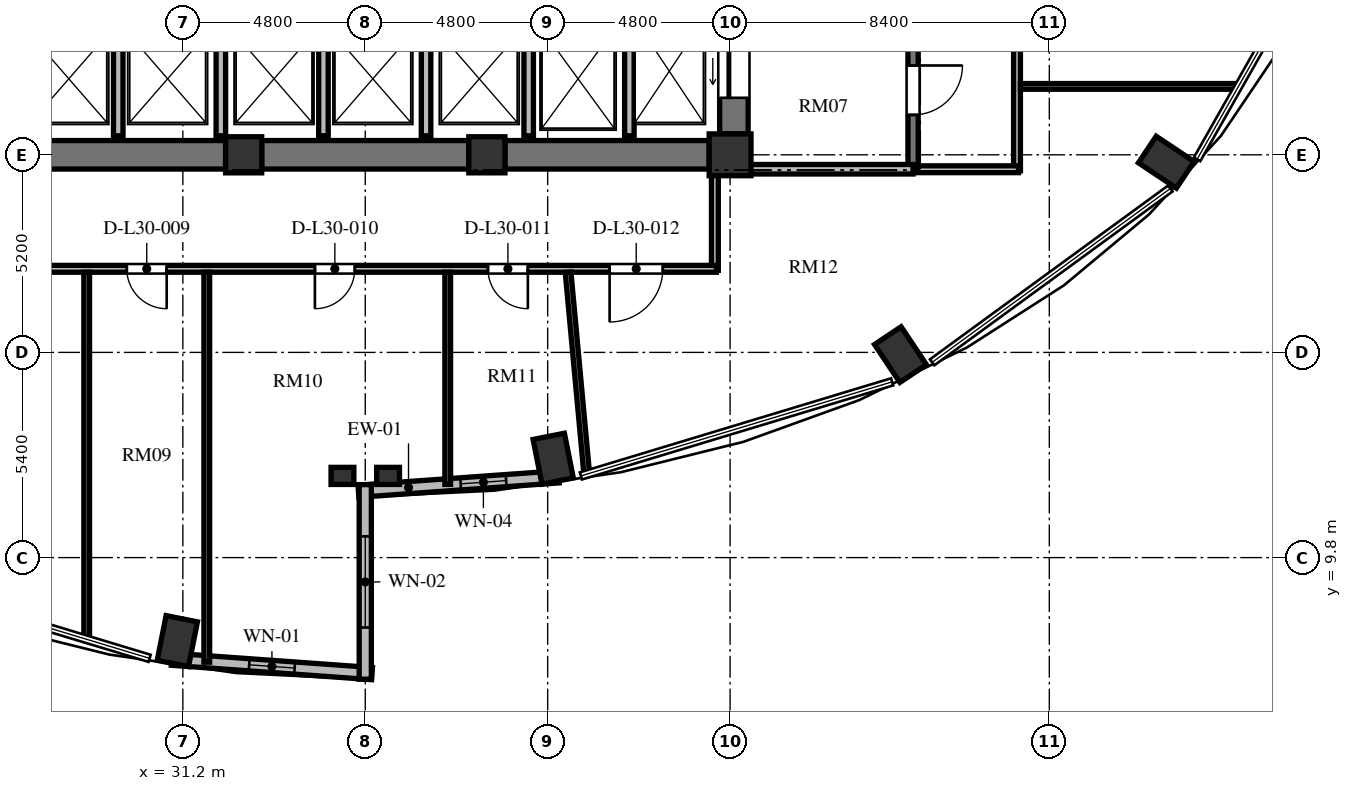
"""IFC4 building model, lengths in metres.
Left out: names, types, materials, properties, quantities, classifications, styles, units other than length and angle.
Written with IfcOpenShell. Run it as: python <this file> out.ifc"""

import sys

from ifc_helpers import new_model, si_unit, direction, frame, frame_2d, origin, origin_2d, place, context, subcontext, project, spatial, rectangle, extrude, element, fill, save


model = new_model("IFC4")
c1 = context("Model", 3, precision=1e-05, world=origin(), true_north=direction((0.0, 1.0)))
c2 = subcontext(c1, "Body", "Model", "MODEL_VIEW")
j1 = project(units=[si_unit("LENGTHUNIT", "METRE"), si_unit("PLANEANGLEUNIT", "RADIAN")], contexts=[c1])
p1 = place(None, origin())
s1 = spatial("IfcSite", under=j1, at=p1, CompositionType="ELEMENT")
p2 = place(p1, origin())
s2 = spatial("IfcBuilding", under=s1, at=p2, CompositionType="ELEMENT")
p3 = place(p2, frame((0.0, 0.0, 118.224)))
s3 = spatial("IfcBuildingStorey", under=s2, at=p3, CompositionType="ELEMENT", Elevation=118.224)
for number, where, z_axis, x_axis in (
    (1, (40.946, 12.403, 0.0), (0.0, 0.0, 1.0), (0.195, -0.981, 0.0)),
    (2, (50.084, 15.143, 0.0), (0.0, 0.0, 1.0), (0.556, -0.831, 0.0)),
    (3, (57.078, 20.205, 0.0), (0.0, 0.0, 1.0), (0.831, -0.556, 0.0)),
    (4, (31.054, 7.603, 0.0), (0.0, 0.0, 1.0), (-0.195, -0.981, 0.0)),
):
    element("IfcColumn", number, at=place(p3, frame(where, z_axis=z_axis, x_axis=x_axis)), inside=s3, PredefinedType="COLUMN", context=c2, shape_type="SweptSolid", body=[
        extrude(rectangle(XDim=1.2, YDim=0.84, at=origin_2d()), origin(), (0.0, 0.0, 1.0), 3.648),
    ])
for number, where, z_axis, x_axis in (
    (5, (32.8, 20.4, 0.0), (0.0, 0.0, 1.0), (1.0, 0.0, 0.0)),
    (6, (39.2, 20.4, 0.0), (0.0, 0.0, 1.0), (1.0, 0.0, 0.0)),
):
    element("IfcColumn", number, at=place(p3, frame(where, z_axis=z_axis, x_axis=x_axis)), inside=s3, PredefinedType="COLUMN", context=c2, shape_type="SweptSolid", body=[
        extrude(rectangle(XDim=0.95, YDim=0.95, at=origin_2d()), origin(), (0.0, 0.0, 1.0), 3.648),
    ])
p4 = place(p3, frame((45.6, 20.4, 0.0), z_axis=(0.0, 0.0, 1.0), x_axis=(1.0, 0.0, 0.0)))
e7 = element("IfcColumn", 7, at=p4, inside=s3, PredefinedType="COLUMN", context=c2, shape_type="SweptSolid", body=[
    extrude(rectangle(XDim=1.1, YDim=1.1, at=origin_2d()), origin(), (0.0, 0.0, 1.0), 3.648),
])
for number, where, z_axis, x_axis in (
    (8, (35.4, 11.95, 0.0), (0.0, 0.0, 1.0), (1.0, 0.0, 0.0)),
    (9, (36.6, 11.95, 0.0), (0.0, 0.0, 1.0), (1.0, 0.0, 0.0)),
):
    element("IfcColumn", number, at=place(p3, frame(where, z_axis=z_axis, x_axis=x_axis)), inside=s3, PredefinedType="PILASTER", context=c2, shape_type="SweptSolid", body=[
        extrude(rectangle(XDim=0.6, YDim=0.45, at=origin_2d()), origin(), (0.0, 0.0, 1.0), 3.648),
    ])
p5 = place(p3, frame((45.7, 20.95, 0.0), z_axis=(0.0, 0.0, 1.0), x_axis=(0.0, 1.0, 0.0)))
e10 = element("IfcWall", 10, at=p5, inside=s3, PredefinedType="SHEAR", context=c2, shape_type="SweptSolid", body=[
    extrude(rectangle(XDim=14.1, YDim=0.75, at=frame_2d((7.05, 0.0))), origin(), (0.0, 0.0, 1.0), 3.648),
])
p6 = place(p5, frame((11.75, 0.0, 0.0)))
e11 = element("IfcOpeningElement", 11, at=p6, cuts=e10, PredefinedType="OPENING", context=c2, shape_type="SweptSolid", body=[
    extrude(rectangle(XDim=1.4, YDim=2.3, at=frame_2d((0.7, 1.15))), frame((0.0, 0.385, 0.0), z_axis=(0.0, -1.0, 0.0), x_axis=(1.0, 0.0, 0.0)), (0.0, 0.0, 1.0), 0.77),
])
p7 = place(p5, frame((0.95, 0.0, 0.0)))
e12 = element("IfcOpeningElement", 12, at=p7, cuts=e10, PredefinedType="OPENING", context=c2, shape_type="SweptSolid", body=[
    extrude(rectangle(XDim=1.4, YDim=2.3, at=frame_2d((0.7, 1.15))), frame((0.0, 0.385, 0.0), z_axis=(0.0, -1.0, 0.0), x_axis=(1.0, 0.0, 0.0)), (0.0, 0.0, 1.0), 0.77),
])
p8 = place(p3, frame((26.95, 20.4, 0.0), z_axis=(0.0, 0.0, 1.0), x_axis=(1.0, 0.0, 0.0)))
e13 = element("IfcWall", 13, at=p8, inside=s3, PredefinedType="SHEAR", context=c2, shape_type="SweptSolid", body=[
    extrude(rectangle(XDim=5.375, YDim=0.75, at=frame_2d((2.688, 0.0))), origin(), (0.0, 0.0, 1.0), 3.648),
])
p9 = place(p3, frame((33.275, 20.4, 0.0), z_axis=(0.0, 0.0, 1.0), x_axis=(1.0, 0.0, 0.0)))
e14 = element("IfcWall", 14, at=p9, inside=s3, PredefinedType="SHEAR", context=c2, shape_type="SweptSolid", body=[
    extrude(rectangle(XDim=5.45, YDim=0.75, at=frame_2d((2.725, 0.0))), origin(), (0.0, 0.0, 1.0), 3.648),
])
p10 = place(p3, frame((39.675, 20.4, 0.0), z_axis=(0.0, 0.0, 1.0), x_axis=(1.0, 0.0, 0.0)))
e15 = element("IfcWall", 15, at=p10, inside=s3, PredefinedType="SHEAR", context=c2, shape_type="SweptSolid", body=[
    extrude(rectangle(XDim=5.375, YDim=0.75, at=frame_2d((2.688, 0.0))), origin(), (0.0, 0.0, 1.0), 3.648),
])
p11 = place(p3, frame((35.821, 11.547, 0.0), z_axis=(0.0, 0.0, 1.0), x_axis=(0.997432364291, 0.071614793619, 0.0)))
e16 = element("IfcWall", 16, at=p11, inside=s3, PredefinedType="SOLIDWALL", context=c2, shape_type="SweptSolid", body=[
    extrude(rectangle(XDim=5.284, YDim=0.32, at=frame_2d((2.642, 0.0))), origin(), (0.0, 0.0, 1.0), 3.428),
])
p12 = place(p11, frame((2.697, 0.0, 0.85)))
e17 = element("IfcOpeningElement", 17, at=p12, cuts=e16, PredefinedType="OPENING", context=c2, shape_type="SweptSolid", body=[
    extrude(rectangle(XDim=1.2, YDim=1.8, at=frame_2d((0.6, 0.9))), frame((0.0, 0.17, 0.0), z_axis=(0.0, -1.0, 0.0), x_axis=(1.0, 0.0, 0.0)), (0.0, 0.0, 1.0), 0.34),
])
p13 = place(p3, frame((30.909, 7.125, 0.0), z_axis=(0.0, 0.0, 1.0), x_axis=(0.997431890304, -0.071621394884, 0.0)))
e18 = element("IfcWall", 18, at=p13, inside=s3, PredefinedType="SOLIDWALL", context=c2, shape_type="SweptSolid", body=[
    extrude(rectangle(XDim=5.284, YDim=0.32, at=frame_2d((2.642, 0.0))), origin(), (0.0, 0.0, 1.0), 3.428),
])
p14 = place(p13, frame((2.042, 0.0, 0.85)))
e19 = element("IfcOpeningElement", 19, at=p14, cuts=e18, PredefinedType="OPENING", context=c2, shape_type="SweptSolid", body=[
    extrude(rectangle(XDim=1.2, YDim=2.2, at=frame_2d((0.6, 1.1))), frame((0.0, 0.17, 0.0), z_axis=(0.0, -1.0, 0.0), x_axis=(1.0, 0.0, 0.0)), (0.0, 0.0, 1.0), 0.34),
])
p15 = place(p3, frame((36.0, 6.6, 0.0), z_axis=(0.0, 0.0, 1.0), x_axis=(0.0, 1.0, 0.0)))
e20 = element("IfcWall", 20, at=p15, inside=s3, PredefinedType="SOLIDWALL", context=c2, shape_type="SweptSolid", body=[
    extrude(rectangle(XDim=5.12, YDim=0.32, at=frame_2d((2.56, 0.0))), origin(), (0.0, 0.0, 1.0), 3.428),
])
p16 = place(p15, frame((1.36, 0.0, 0.84)))
e21 = element("IfcOpeningElement", 21, at=p16, cuts=e20, PredefinedType="OPENING", context=c2, shape_type="SweptSolid", body=[
    extrude(rectangle(XDim=2.4, YDim=2.04, at=frame_2d((1.2, 1.02))), frame((0.0, 0.17, 0.0), z_axis=(0.0, -1.0, 0.0), x_axis=(1.0, 0.0, 0.0)), (0.0, 0.0, 1.0), 0.34),
])
p17 = place(p3, frame((42.95, 20.9, 0.0), z_axis=(0.0, 0.0, 1.0), x_axis=(0.0, 1.0, 0.0)))
e22 = element("IfcWall", 22, at=p17, inside=s3, PredefinedType="SOLIDWALL", context=c2, shape_type="SweptSolid", body=[
    extrude(rectangle(XDim=3.2, YDim=0.25, at=frame_2d((1.6, 0.0))), origin(), (0.0, 0.0, 1.0), 3.428),
])
for number, where, z_axis, x_axis in (
    (23, (29.5, 20.9, 0.0), (0.0, 0.0, 1.0), (0.0, 1.0, 0.0)),
    (24, (32.2, 20.9, 0.0), (0.0, 0.0, 1.0), (0.0, 1.0, 0.0)),
    (25, (34.9, 20.9, 0.0), (0.0, 0.0, 1.0), (0.0, 1.0, 0.0)),
    (26, (37.6, 20.9, 0.0), (0.0, 0.0, 1.0), (0.0, 1.0, 0.0)),
    (27, (40.3, 20.9, 0.0), (0.0, 0.0, 1.0), (0.0, 1.0, 0.0)),
):
    element("IfcWall", number, at=place(p3, frame(where, z_axis=z_axis, x_axis=x_axis)), inside=s3, PredefinedType="SOLIDWALL", context=c2, shape_type="SweptSolid", body=[
        extrude(rectangle(XDim=2.8, YDim=0.25, at=frame_2d((1.4, 0.0))), origin(), (0.0, 0.0, 1.0), 3.428),
    ])
p18 = place(p3, frame((50.415, 35.845, 0.0), z_axis=(0.0, 0.0, 1.0), x_axis=(0.0, -1.0, 0.0)))
e28 = element("IfcWall", 28, at=p18, inside=s3, PredefinedType="SHEAR", context=c2, shape_type="SweptSolid", body=[
    extrude(rectangle(XDim=15.825, YDim=0.27, at=frame_2d((7.913, 0.0))), origin(), (0.0, 0.0, 1.0), 3.648),
])
p19 = place(p18, frame((4.445, 0.0, 0.0)))
e29 = element("IfcOpeningElement", 29, at=p19, cuts=e28, PredefinedType="OPENING", context=c2, shape_type="SweptSolid", body=[
    extrude(rectangle(XDim=1.2, YDim=2.15, at=frame_2d((0.6, 1.075))), frame((0.0, 0.145, 0.0), z_axis=(0.0, -1.0, 0.0), x_axis=(1.0, 0.0, 0.0)), (0.0, 0.0, 1.0), 0.29),
])
p20 = place(p18, frame((1.295, 0.0, 0.0)))
e30 = element("IfcOpeningElement", 30, at=p20, cuts=e28, PredefinedType="OPENING", context=c2, shape_type="SweptSolid", body=[
    extrude(rectangle(XDim=1.3, YDim=2.2, at=frame_2d((0.65, 1.1))), frame((0.0, 0.145, 0.0), z_axis=(0.0, -1.0, 0.0), x_axis=(1.0, 0.0, 0.0)), (0.0, 0.0, 1.0), 0.29),
])
p21 = place(p18, frame((13.095, 0.0, 0.0)))
e31 = element("IfcOpeningElement", 31, at=p21, cuts=e28, PredefinedType="OPENING", context=c2, shape_type="SweptSolid", body=[
    extrude(rectangle(XDim=1.3, YDim=2.2, at=frame_2d((0.65, 1.1))), frame((0.0, 0.145, 0.0), z_axis=(0.0, -1.0, 0.0), x_axis=(1.0, 0.0, 0.0)), (0.0, 0.0, 1.0), 0.29),
])
p22 = place(p3, frame((45.7, 20.02, 0.0), z_axis=(0.0, 0.0, 1.0), x_axis=(1.0, 0.0, 0.0)))
e32 = element("IfcWall", 32, at=p22, inside=s3, PredefinedType="SOLIDWALL", context=c2, shape_type="SweptSolid", body=[
    extrude(rectangle(XDim=4.715, YDim=0.25, at=frame_2d((2.357, 0.0))), origin(), (0.0, 0.0, 1.0), 3.428),
])
p23 = place(p3, frame((53.15, 26.64, 0.0), z_axis=(0.0, 0.0, 1.0), x_axis=(0.0, -1.0, 0.0)))
e33 = element("IfcWall", 33, at=p23, inside=s3, PredefinedType="PARTITIONING", context=c2, shape_type="SweptSolid", body=[
    extrude(rectangle(XDim=6.66, YDim=0.18, at=frame_2d((3.33, 0.0))), origin(), (0.0, 0.0, 1.0), 3.428),
])
p24 = place(p3, frame((53.19, 20.02, 0.0), z_axis=(0.0, 0.0, 1.0), x_axis=(-1.0, 0.0, 0.0)))
e34 = element("IfcWall", 34, at=p24, inside=s3, PredefinedType="PARTITIONING", context=c2, shape_type="SweptSolid", body=[
    extrude(rectangle(XDim=2.65, YDim=0.18, at=frame_2d((1.325, 0.0))), origin(), (0.0, 0.0, 1.0), 3.428),
])
p25 = place(p3, frame((45.2, 19.91, 0.0), z_axis=(0.0, 0.0, 1.0), x_axis=(0.0, -1.0, 0.0)))
e35 = element("IfcWall", 35, at=p25, inside=s3, PredefinedType="PARTITIONING", context=c2, shape_type="SweptSolid", body=[
    extrude(rectangle(XDim=2.55, YDim=0.18, at=frame_2d((1.275, 0.0))), origin(), (0.0, 0.0, 1.0), 3.428),
])
p26 = place(p3, frame((45.24, 17.4, 0.0), z_axis=(0.0, 0.0, 1.0), x_axis=(-1.0, 0.0, 0.0)))
e36 = element("IfcWall", 36, at=p26, inside=s3, PredefinedType="PARTITIONING", context=c2, shape_type="SweptSolid", body=[
    extrude(rectangle(XDim=21.93, YDim=0.18, at=frame_2d((10.965, 0.0))), origin(), (0.0, 0.0, 1.0), 3.053),
])
p27 = place(p26, frame((18.391, 0.0, 0.0)))
e37 = element("IfcOpeningElement", 37, at=p27, cuts=e36, PredefinedType="OPENING", context=c2, shape_type="SweptSolid", body=[
    extrude(rectangle(XDim=1.4, YDim=2.2, at=frame_2d((0.7, 1.1))), frame((0.0, 0.1, 0.0), z_axis=(0.0, -1.0, 0.0), x_axis=(1.0, 0.0, 0.0)), (0.0, 0.0, 1.0), 0.2),
])
p28 = place(p26, frame((14.465, 0.0, 0.0)))
e38 = element("IfcOpeningElement", 38, at=p28, cuts=e36, PredefinedType="OPENING", context=c2, shape_type="SweptSolid", body=[
    extrude(rectangle(XDim=1.05, YDim=2.15, at=frame_2d((0.525, 1.075))), frame((0.0, 0.1, 0.0), z_axis=(0.0, -1.0, 0.0), x_axis=(1.0, 0.0, 0.0)), (0.0, 0.0, 1.0), 0.2),
])
p29 = place(p26, frame((9.515, 0.0, 0.0)))
e39 = element("IfcOpeningElement", 39, at=p29, cuts=e36, PredefinedType="OPENING", context=c2, shape_type="SweptSolid", body=[
    extrude(rectangle(XDim=1.05, YDim=2.15, at=frame_2d((0.525, 1.075))), frame((0.0, 0.1, 0.0), z_axis=(0.0, -1.0, 0.0), x_axis=(1.0, 0.0, 0.0)), (0.0, 0.0, 1.0), 0.2),
])
p30 = place(p26, frame((4.961, 0.0, 0.0)))
e40 = element("IfcOpeningElement", 40, at=p30, cuts=e36, PredefinedType="OPENING", context=c2, shape_type="SweptSolid", body=[
    extrude(rectangle(XDim=1.05, YDim=2.15, at=frame_2d((0.525, 1.075))), frame((0.0, 0.1, 0.0), z_axis=(0.0, -1.0, 0.0), x_axis=(1.0, 0.0, 0.0)), (0.0, 0.0, 1.0), 0.2),
])
p31 = place(p26, frame((1.41, 0.0, 0.0)))
e41 = element("IfcOpeningElement", 41, at=p31, cuts=e36, PredefinedType="OPENING", context=c2, shape_type="SweptSolid", body=[
    extrude(rectangle(XDim=1.4, YDim=2.2, at=frame_2d((0.7, 1.1))), frame((0.0, 0.1, 0.0), z_axis=(0.0, -1.0, 0.0), x_axis=(1.0, 0.0, 0.0)), (0.0, 0.0, 1.0), 0.2),
])
p32 = place(p3, frame((53.24, 22.2, 0.0), z_axis=(0.0, 0.0, 1.0), x_axis=(1.0, 0.0, 0.0)))
e42 = element("IfcWall", 42, at=p32, inside=s3, PredefinedType="PARTITIONING", context=c2, shape_type="SweptSolid", body=[
    extrude(rectangle(XDim=5.731, YDim=0.15, at=frame_2d((2.866, 0.0))), origin(), (0.0, 0.0, 1.0), 3.428),
])
p33 = place(p3, frame((28.67, 7.664, 0.0), z_axis=(0.0, 0.0, 1.0), x_axis=(0.0, 1.0, 0.0)))
e43 = element("IfcWall", 43, at=p33, inside=s3, PredefinedType="PARTITIONING", context=c2, shape_type="SweptSolid", body=[
    extrude(rectangle(XDim=9.646, YDim=0.15, at=frame_2d((4.823, 0.0))), origin(), (0.0, 0.0, 1.0), 3.428),
])
p34 = place(p3, frame((31.83, 7.048, 0.0), z_axis=(0.0, 0.0, 1.0), x_axis=(0.0, 1.0, 0.0)))
e44 = element("IfcWall", 44, at=p34, inside=s3, PredefinedType="PARTITIONING", context=c2, shape_type="SweptSolid", body=[
    extrude(rectangle(XDim=10.262, YDim=0.15, at=frame_2d((5.131, 0.0))), origin(), (0.0, 0.0, 1.0), 2.813),
])
p35 = place(p3, frame((38.17, 11.727, 0.0), z_axis=(0.0, 0.0, 1.0), x_axis=(0.0, 1.0, 0.0)))
e45 = element("IfcWall", 45, at=p35, inside=s3, PredefinedType="PARTITIONING", context=c2, shape_type="SweptSolid", body=[
    extrude(rectangle(XDim=5.583, YDim=0.15, at=frame_2d((2.792, 0.0))), origin(), (0.0, 0.0, 1.0), 3.428),
])
p36 = place(p3, frame((41.829, 11.995, 0.0), z_axis=(0.0, 0.0, 1.0), x_axis=(-0.092106681554, 0.995749144721, 0.0)))
e46 = element("IfcWall", 46, at=p36, inside=s3, PredefinedType="PARTITIONING", context=c2, shape_type="SweptSolid", body=[
    extrude(rectangle(XDim=5.338, YDim=0.15, at=frame_2d((2.669, 0.0))), origin(), (0.0, 0.0, 1.0), 3.428),
])
p37 = place(p12, origin())
e47 = element("IfcWindow", 47, at=p37, inside=s3, PartitioningType="SINGLE_PANEL", PredefinedType="WINDOW", context=c2, shape_type="SweptSolid", body=[
    extrude(rectangle(XDim=1.2, YDim=1.8, at=frame_2d((0.6, 0.9))), frame((0.0, 0.03, 0.0), z_axis=(0.0, -1.0, 0.0), x_axis=(1.0, 0.0, 0.0)), (0.0, 0.0, 1.0), 0.06),
])
fill(e17, e47)
p38 = place(p14, origin())
e48 = element("IfcWindow", 48, at=p38, inside=s3, PartitioningType="SINGLE_PANEL", PredefinedType="WINDOW", context=c2, shape_type="SweptSolid", body=[
    extrude(rectangle(XDim=1.2, YDim=2.2, at=frame_2d((0.6, 1.1))), frame((0.0, 0.03, 0.0), z_axis=(0.0, -1.0, 0.0), x_axis=(1.0, 0.0, 0.0)), (0.0, 0.0, 1.0), 0.06),
])
fill(e19, e48)
p39 = place(p16, origin())
e49 = element("IfcWindow", 49, at=p39, inside=s3, PartitioningType="SINGLE_PANEL", PredefinedType="WINDOW", context=c2, shape_type="SweptSolid", body=[
    extrude(rectangle(XDim=2.4, YDim=2.04, at=frame_2d((1.2, 1.02))), frame((0.0, 0.03, 0.0), z_axis=(0.0, -1.0, 0.0), x_axis=(1.0, 0.0, 0.0)), (0.0, 0.0, 1.0), 0.06),
])
fill(e21, e49)
p40 = place(p7, origin())
e50 = element("IfcDoor", 50, at=p40, inside=s3, OperationType="SLIDING_TO_LEFT", PredefinedType="DOOR", context=c2, shape_type="SweptSolid", body=[
    extrude(rectangle(XDim=1.4, YDim=2.3, at=frame_2d((0.7, 1.15))), frame((0.0, 0.025, 0.0), z_axis=(0.0, -1.0, 0.0), x_axis=(1.0, 0.0, 0.0)), (0.0, 0.0, 1.0), 0.05),
])
fill(e12, e50)
p41 = place(p21, origin())
e51 = element("IfcDoor", 51, at=p41, inside=s3, OperationType="SINGLE_SWING_LEFT", PredefinedType="DOOR", context=c2, shape_type="SweptSolid", body=[
    extrude(rectangle(XDim=1.3, YDim=2.2, at=frame_2d((0.65, 1.1))), frame((0.0, 0.025, 0.0), z_axis=(0.0, -1.0, 0.0), x_axis=(1.0, 0.0, 0.0)), (0.0, 0.0, 1.0), 0.05),
])
fill(e31, e51)
p42 = place(p28, origin())
e52 = element("IfcDoor", 52, at=p42, inside=s3, OperationType="SINGLE_SWING_LEFT", PredefinedType="DOOR", context=c2, shape_type="SweptSolid", body=[
    extrude(rectangle(XDim=1.05, YDim=2.15, at=frame_2d((0.525, 1.075))), frame((0.0, 0.025, 0.0), z_axis=(0.0, -1.0, 0.0), x_axis=(1.0, 0.0, 0.0)), (0.0, 0.0, 1.0), 0.05),
])
fill(e38, e52)
p43 = place(p29, origin())
e53 = element("IfcDoor", 53, at=p43, inside=s3, OperationType="SINGLE_SWING_RIGHT", PredefinedType="DOOR", context=c2, shape_type="SweptSolid", body=[
    extrude(rectangle(XDim=1.05, YDim=2.15, at=frame_2d((0.525, 1.075))), frame((0.0, 0.025, 0.0), z_axis=(0.0, -1.0, 0.0), x_axis=(1.0, 0.0, 0.0)), (0.0, 0.0, 1.0), 0.05),
])
fill(e39, e53)
p44 = place(p30, origin())
e54 = element("IfcDoor", 54, at=p44, inside=s3, OperationType="SINGLE_SWING_LEFT", PredefinedType="DOOR", context=c2, shape_type="SweptSolid", body=[
    extrude(rectangle(XDim=1.05, YDim=2.15, at=frame_2d((0.525, 1.075))), frame((0.0, 0.025, 0.0), z_axis=(0.0, -1.0, 0.0), x_axis=(1.0, 0.0, 0.0)), (0.0, 0.0, 1.0), 0.05),
])
fill(e40, e54)
p45 = place(p31, origin())
e55 = element("IfcDoor", 55, at=p45, inside=s3, OperationType="SINGLE_SWING_RIGHT", PredefinedType="DOOR", context=c2, shape_type="SweptSolid", body=[
    extrude(rectangle(XDim=1.4, YDim=2.2, at=frame_2d((0.7, 1.1))), frame((0.0, 0.025, 0.0), z_axis=(0.0, -1.0, 0.0), x_axis=(1.0, 0.0, 0.0)), (0.0, 0.0, 1.0), 0.05),
])
fill(e41, e55)
save(model, sys.argv[1])
